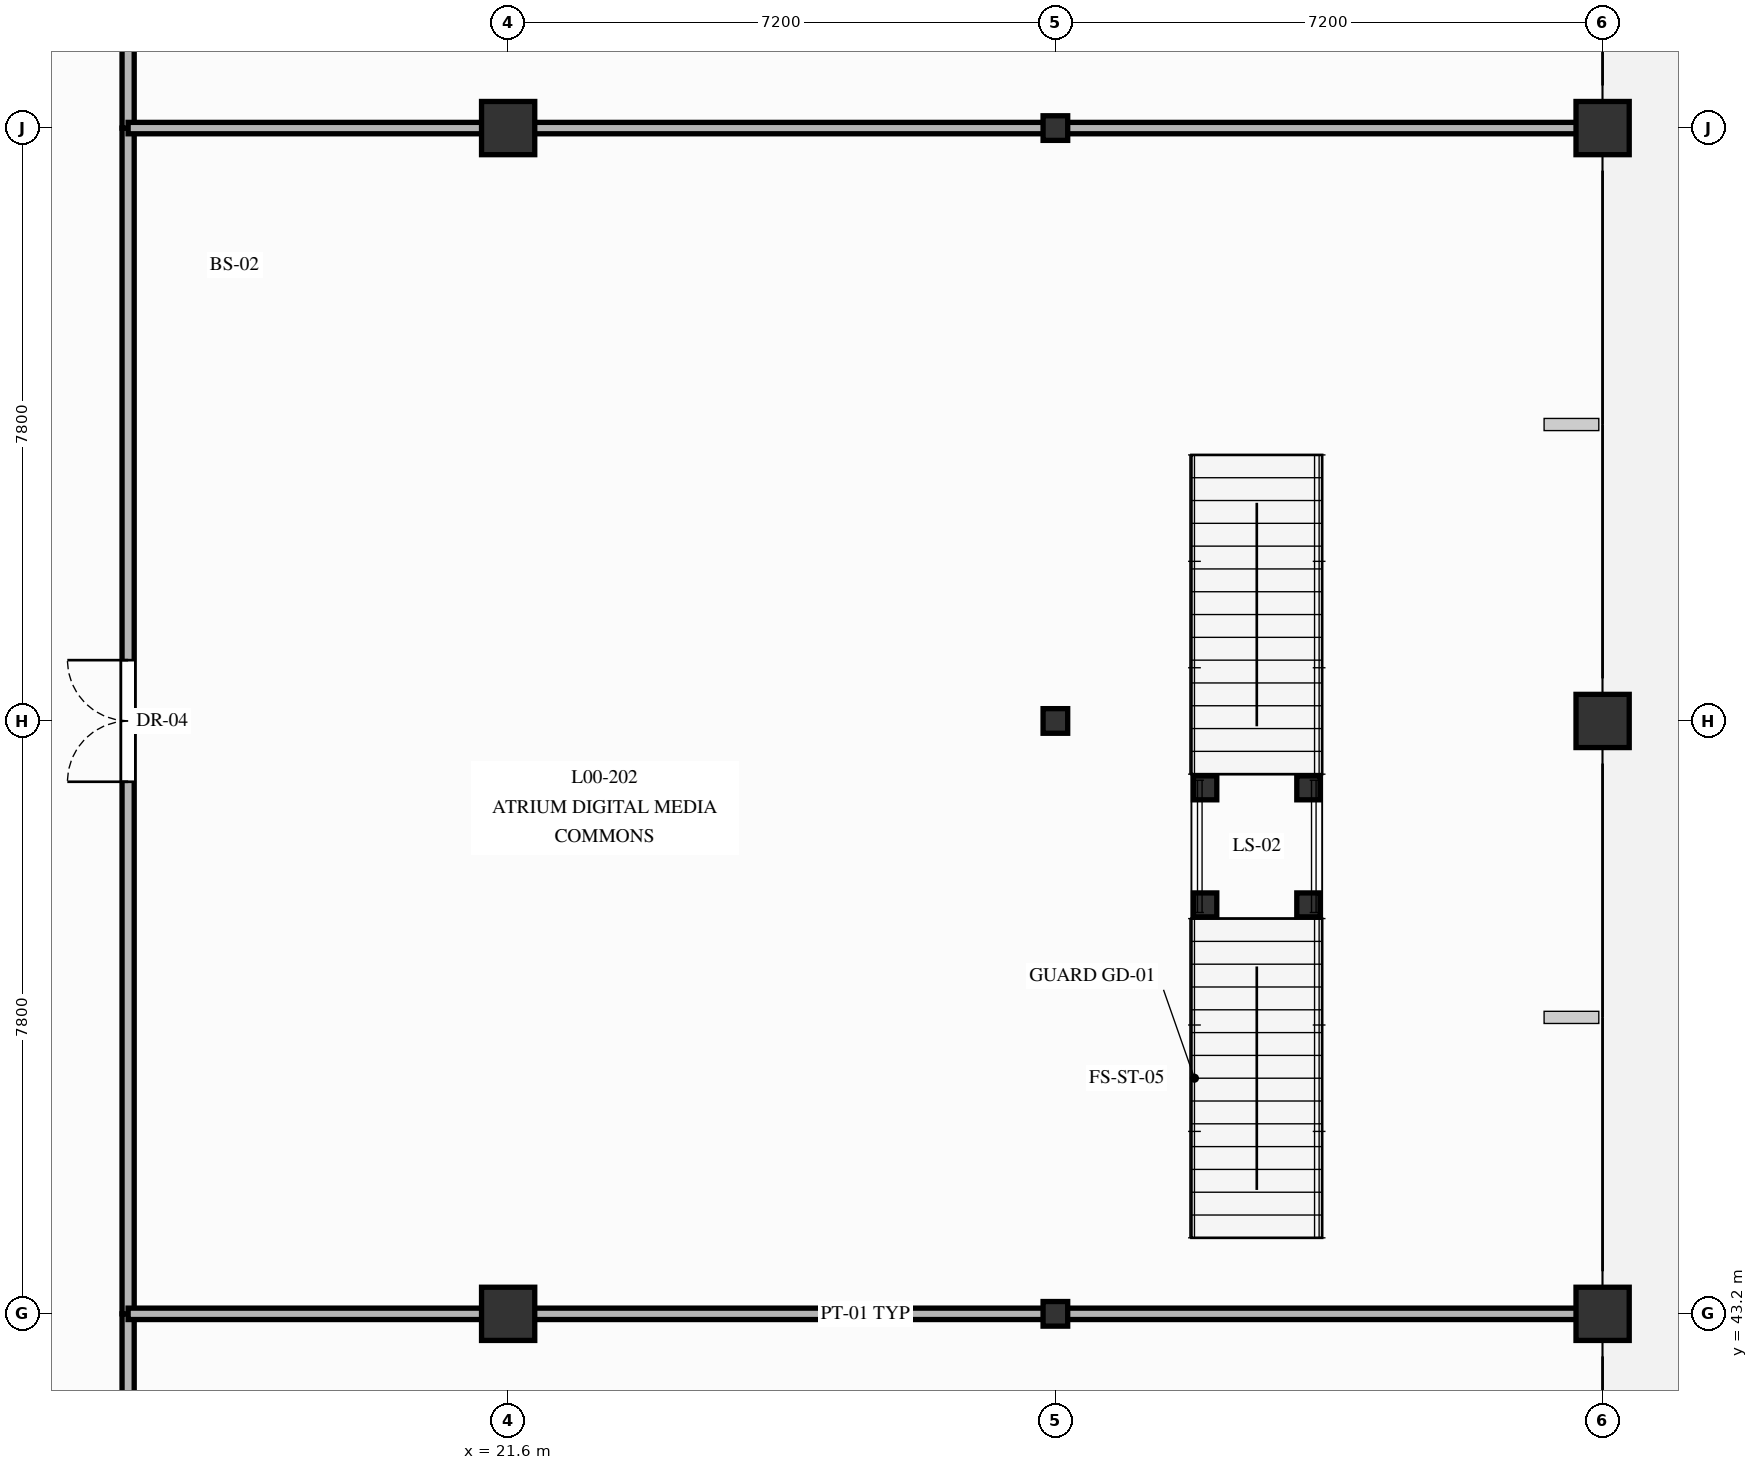
"""IFC4 building model, lengths in metres.
Left out: names, types, materials, properties, quantities, classifications, styles, units other than length and angle.
Written with IfcOpenShell. Run it as: python <this file> out.ifc"""

import sys

from ifc_helpers import new_model, si_unit, direction, frame, frame_2d, origin, origin_2d, place, context, subcontext, project, spatial, rectangle, hollow_circle, i_section, extrude, element, fill, save


model = new_model("IFC4")
c1 = context("Model", 3, precision=1e-05, world=origin(), true_north=direction((0.0, 1.0)))
c2 = subcontext(c1, "Body", "Model", "MODEL_VIEW")
j1 = project(units=[si_unit("LENGTHUNIT", "METRE"), si_unit("PLANEANGLEUNIT", "RADIAN")], contexts=[c1])
p1 = place(None, origin())
s1 = spatial("IfcSite", under=j1, at=p1, CompositionType="ELEMENT")
p2 = place(p1, origin())
s2 = spatial("IfcBuilding", under=s1, at=p2, CompositionType="ELEMENT")
p3 = place(p2, origin())
s3 = spatial("IfcBuildingStorey", under=s2, at=p3, CompositionType="ELEMENT", Elevation=0.0)
for number, where, z_axis, x_axis in (
    (1, (21.6, 43.2, 0.0), (0.0, 0.0, 1.0), (1.0, 0.0, 0.0)),
    (2, (21.6, 58.8, 0.0), (0.0, 0.0, 1.0), (1.0, 0.0, 0.0)),
):
    element("IfcColumn", number, at=place(p3, frame(where, z_axis=z_axis, x_axis=x_axis)), inside=s3, PredefinedType="COLUMN", context=c2, shape_type="SweptSolid", body=[
        extrude(rectangle(XDim=0.7, YDim=0.7, at=origin_2d()), origin(), (0.0, 0.0, 1.0), 5.1),
    ])
for number, where, z_axis, x_axis in (
    (3, (28.8, 43.2, 0.0), (0.0, 0.0, 1.0), (1.0, 0.0, 0.0)),
    (4, (28.8, 51.0, 0.0), (0.0, 0.0, 1.0), (1.0, 0.0, 0.0)),
    (5, (28.8, 58.8, 0.0), (0.0, 0.0, 1.0), (1.0, 0.0, 0.0)),
):
    element("IfcColumn", number, at=place(p3, frame(where, z_axis=z_axis, x_axis=x_axis)), inside=s3, PredefinedType="COLUMN", context=c2, shape_type="SweptSolid", body=[
        extrude(hollow_circle(Radius=0.162, WallThickness=0.012, at=origin_2d()), origin(), (0.0, 0.0, 1.0), 5.1),
    ])
for number, where, z_axis, x_axis in (
    (6, (36.0, 43.2, 0.0), (0.0, 0.0, 1.0), (1.0, 0.0, 0.0)),
    (7, (36.0, 51.0, 0.0), (0.0, 0.0, 1.0), (1.0, 0.0, 0.0)),
    (8, (36.0, 58.8, 0.0), (0.0, 0.0, 1.0), (1.0, 0.0, 0.0)),
):
    element("IfcColumn", number, at=place(p3, frame(where, z_axis=z_axis, x_axis=x_axis)), inside=s3, PredefinedType="COLUMN", context=c2, shape_type="SweptSolid", body=[
        extrude(rectangle(XDim=0.7, YDim=0.7, at=origin_2d()), origin(), (0.0, 0.0, 1.0), 5.1),
    ])
for number, where, z_axis, x_axis in (
    (9, (30.77, 48.58, 0.0), (0.0, 0.0, 1.0), (1.0, 0.0, 0.0)),
    (10, (32.13, 48.58, 0.0), (0.0, 0.0, 1.0), (1.0, 0.0, 0.0)),
    (11, (30.77, 50.12, 0.0), (0.0, 0.0, 1.0), (1.0, 0.0, 0.0)),
    (12, (32.13, 50.12, 0.0), (0.0, 0.0, 1.0), (1.0, 0.0, 0.0)),
):
    element("IfcColumn", number, at=place(p3, frame(where, z_axis=z_axis, x_axis=x_axis)), inside=s3, PredefinedType="COLUMN", context=c2, shape_type="SweptSolid", body=[
        extrude(i_section(OverallWidth=0.307, OverallDepth=0.315, WebThickness=0.012, FlangeThickness=0.019, at=origin_2d()), origin(), (0.0, 0.0, 1.0), 2.33),
    ])
p4 = place(p3, frame((16.6, 28.8, 0.0), z_axis=(0.0, 0.0, 1.0), x_axis=(0.0, 1.0, 0.0)))
e13 = element("IfcWall", 13, at=p4, inside=s3, PredefinedType="PARTITIONING", context=c2, shape_type="SweptSolid", body=[
    extrude(rectangle(XDim=14.4, YDim=0.16, at=frame_2d((7.2, 0.0))), origin(), (0.0, 0.0, 1.0), 4.348),
])
p5 = place(p4, frame((6.4, 0.0, 0.0)))
e14 = element("IfcOpeningElement", 14, at=p5, cuts=e13, PredefinedType="OPENING", context=c2, shape_type="SweptSolid", body=[
    extrude(rectangle(XDim=1.6, YDim=2.2, at=frame_2d((0.8, 1.1))), frame((0.0, 0.09, 0.0), z_axis=(0.0, -1.0, 0.0), x_axis=(1.0, 0.0, 0.0)), (0.0, 0.0, 1.0), 0.18),
])
p6 = place(p3, frame((16.6, 43.2, 0.0), z_axis=(0.0, 0.0, 1.0), x_axis=(0.0, 1.0, 0.0)))
e15 = element("IfcWall", 15, at=p6, inside=s3, PredefinedType="PARTITIONING", context=c2, shape_type="SweptSolid", body=[
    extrude(rectangle(XDim=15.6, YDim=0.16, at=frame_2d((7.8, 0.0))), origin(), (0.0, 0.0, 1.0), 4.8),
])
p7 = place(p6, frame((7.0, 0.0, 0.0)))
e16 = element("IfcOpeningElement", 16, at=p7, cuts=e15, PredefinedType="OPENING", context=c2, shape_type="SweptSolid", body=[
    extrude(rectangle(XDim=1.6, YDim=2.2, at=frame_2d((0.8, 1.1))), frame((0.0, 0.09, 0.0), z_axis=(0.0, -1.0, 0.0), x_axis=(1.0, 0.0, 0.0)), (0.0, 0.0, 1.0), 0.18),
])
p8 = place(p3, frame((16.6, 43.2, 0.0), z_axis=(0.0, 0.0, 1.0), x_axis=(1.0, 0.0, 0.0)))
e17 = element("IfcWall", 17, at=p8, inside=s3, PredefinedType="PARTITIONING", context=c2, shape_type="SweptSolid", body=[
    extrude(rectangle(XDim=19.4, YDim=0.15, at=frame_2d((9.7, 0.0))), origin(), (0.0, 0.0, 1.0), 4.333),
])
p9 = place(p3, frame((16.6, 58.8, 0.0), z_axis=(0.0, 0.0, 1.0), x_axis=(0.0, 1.0, 0.0)))
e18 = element("IfcWall", 18, at=p9, inside=s3, PredefinedType="PARTITIONING", context=c2, shape_type="SweptSolid", body=[
    extrude(rectangle(XDim=15.6, YDim=0.16, at=frame_2d((7.8, 0.0))), origin(), (0.0, 0.0, 1.0), 4.203),
])
p10 = place(p9, frame((7.0, 0.0, 0.0)))
e19 = element("IfcOpeningElement", 19, at=p10, cuts=e18, PredefinedType="OPENING", context=c2, shape_type="SweptSolid", body=[
    extrude(rectangle(XDim=1.6, YDim=2.2, at=frame_2d((0.8, 1.1))), frame((0.0, 0.09, 0.0), z_axis=(0.0, -1.0, 0.0), x_axis=(1.0, 0.0, 0.0)), (0.0, 0.0, 1.0), 0.18),
])
p11 = place(p3, frame((16.6, 58.8, 0.0), z_axis=(0.0, 0.0, 1.0), x_axis=(1.0, 0.0, 0.0)))
e20 = element("IfcWall", 20, at=p11, inside=s3, PredefinedType="PARTITIONING", context=c2, shape_type="SweptSolid", body=[
    extrude(rectangle(XDim=19.4, YDim=0.15, at=frame_2d((9.7, 0.0))), origin(), (0.0, 0.0, 1.0), 4.203),
])
p12 = place(p7, origin())
e21 = element("IfcDoor", 21, at=p12, inside=s3, OperationType="DOUBLE_DOOR_SINGLE_SWING", PredefinedType="DOOR", context=c2, shape_type="SweptSolid", body=[
    extrude(rectangle(XDim=1.6, YDim=2.2, at=frame_2d((0.8, 1.1))), frame((0.0, 0.025, 0.0), z_axis=(0.0, -1.0, 0.0), x_axis=(1.0, 0.0, 0.0)), (0.0, 0.0, 1.0), 0.05),
])
fill(e16, e21)
save(model, sys.argv[1])
